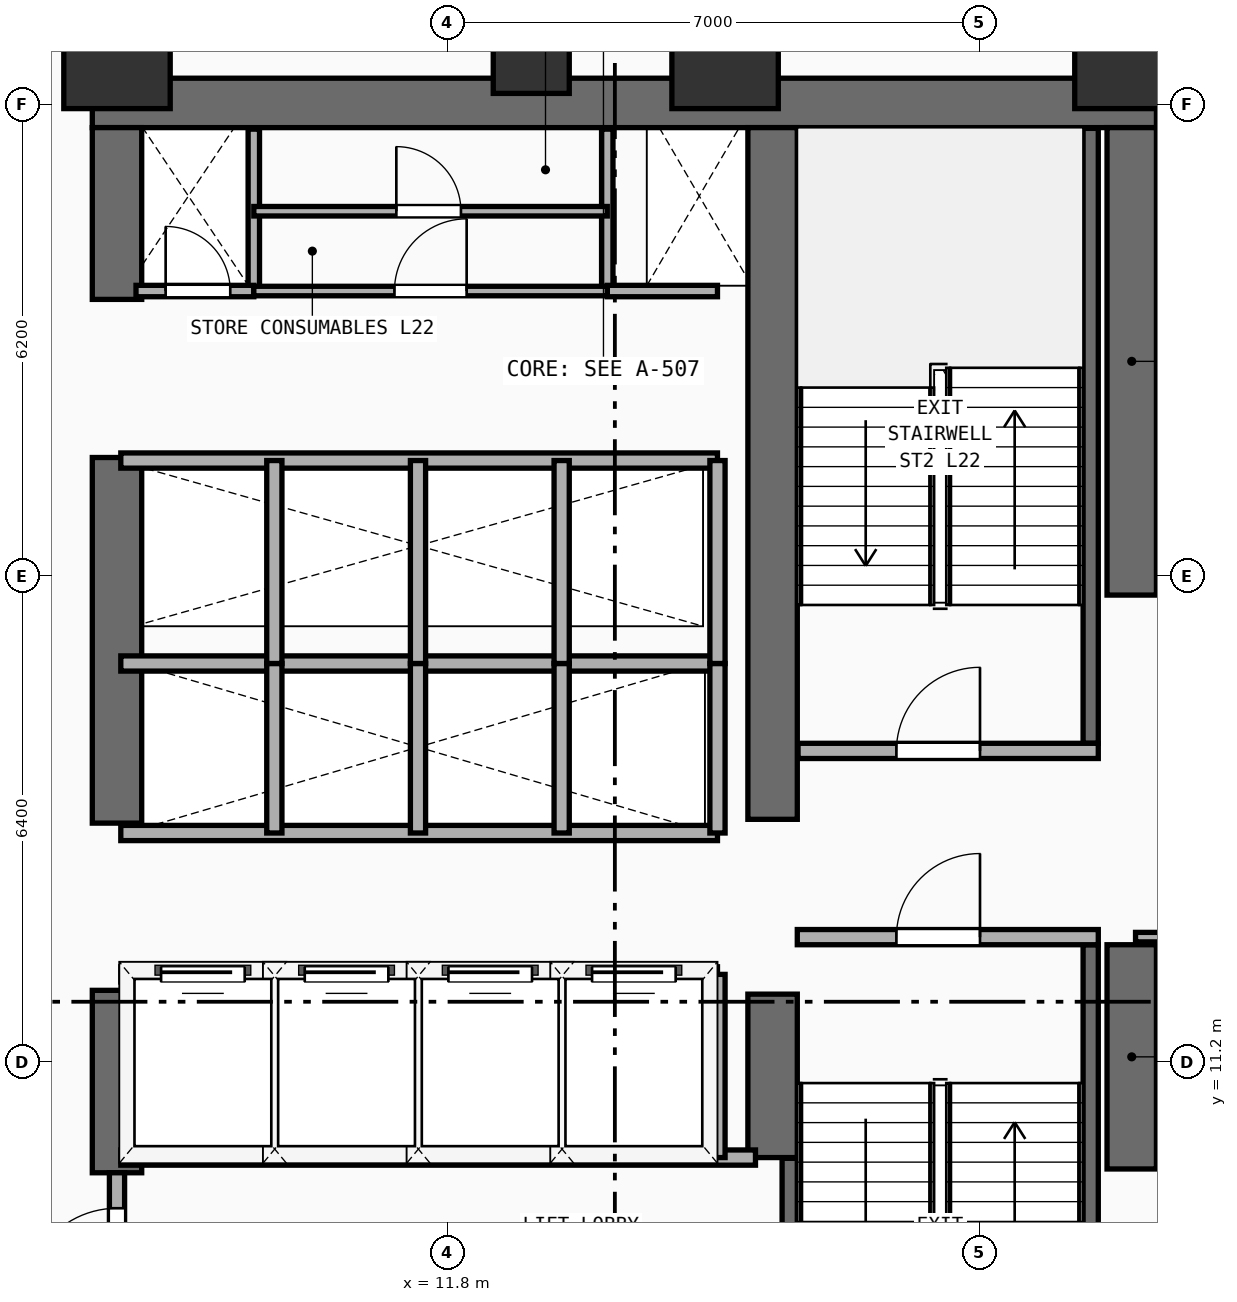
"""IFC4 building model, lengths in metres.
Left out: names, types, materials, properties, quantities, classifications, styles, units other than length and angle.
Written with IfcOpenShell. Run it as: python <this file> out.ifc"""

import sys

from ifc_helpers import new_model, si_unit, direction, frame, frame_2d, origin, origin_2d, place, context, subcontext, project, spatial, rectangle, extrude, element, fill, save


model = new_model("IFC4")
c1 = context("Model", 3, precision=1e-05, world=origin(), true_north=direction((0.0, 1.0)))
c2 = subcontext(c1, "Body", "Model", "MODEL_VIEW")
j1 = project(units=[si_unit("LENGTHUNIT", "METRE"), si_unit("PLANEANGLEUNIT", "RADIAN")], contexts=[c1])
p1 = place(None, origin())
s1 = spatial("IfcSite", under=j1, at=p1, CompositionType="ELEMENT")
p2 = place(p1, origin())
s2 = spatial("IfcBuilding", under=s1, at=p2, CompositionType="ELEMENT")
p3 = place(p2, frame((0.0, 0.0, 87.9)))
s3 = spatial("IfcBuildingStorey", under=s2, at=p3, CompositionType="ELEMENT", Elevation=87.9)
p4 = place(p3, frame((7.125, 23.825, 0.0), z_axis=(0.0, 0.0, 1.0), x_axis=(1.0, 0.0, 0.0)))
e1 = element("IfcWall", 1, at=p4, inside=s3, PredefinedType="SHEAR", context=c2, shape_type="SweptSolid", body=[
    extrude(rectangle(XDim=14.0, YDim=0.65, at=frame_2d((7.0, 0.0))), origin(), (0.0, 0.0, 1.0), 3.54),
])
p5 = place(p3, frame((7.45, 9.75, 0.0), z_axis=(0.0, 0.0, 1.0), x_axis=(0.0, 1.0, 0.0)))
e2 = element("IfcWall", 2, at=p5, inside=s3, PredefinedType="SHEAR", context=c2, shape_type="SweptSolid", body=[
    extrude(rectangle(XDim=2.4, YDim=0.65, at=frame_2d((1.2, 0.0))), origin(), (0.0, 0.0, 1.0), 3.54),
])
p6 = place(p3, frame((7.45, 14.35, 0.0), z_axis=(0.0, 0.0, 1.0), x_axis=(0.0, 1.0, 0.0)))
e3 = element("IfcWall", 3, at=p6, inside=s3, PredefinedType="SHEAR", context=c2, shape_type="SweptSolid", body=[
    extrude(rectangle(XDim=4.81, YDim=0.65, at=frame_2d((2.405, 0.0))), origin(), (0.0, 0.0, 1.0), 3.54),
])
p7 = place(p3, frame((7.45, 21.24, 0.0), z_axis=(0.0, 0.0, 1.0), x_axis=(0.0, 1.0, 0.0)))
e4 = element("IfcWall", 4, at=p7, inside=s3, PredefinedType="SHEAR", context=c2, shape_type="SweptSolid", body=[
    extrude(rectangle(XDim=2.26, YDim=0.65, at=frame_2d((1.13, 0.0))), origin(), (0.0, 0.0, 1.0), 3.54),
])
p8 = place(p3, frame((20.8, 9.8, 0.0), z_axis=(0.0, 0.0, 1.0), x_axis=(0.0, 1.0, 0.0)))
e5 = element("IfcWall", 5, at=p8, inside=s3, PredefinedType="SHEAR", context=c2, shape_type="SweptSolid", body=[
    extrude(rectangle(XDim=2.95, YDim=0.65, at=frame_2d((1.475, 0.0))), origin(), (0.0, 0.0, 1.0), 3.54),
])
p9 = place(p3, frame((20.8, 17.35, 0.0), z_axis=(0.0, 0.0, 1.0), x_axis=(0.0, 1.0, 0.0)))
e6 = element("IfcWall", 6, at=p9, inside=s3, PredefinedType="SHEAR", context=c2, shape_type="SweptSolid", body=[
    extrude(rectangle(XDim=6.15, YDim=0.65, at=frame_2d((3.075, 0.0))), origin(), (0.0, 0.0, 1.0), 3.54),
])
p10 = place(p3, frame((16.075, 9.95, 0.0), z_axis=(0.0, 0.0, 1.0), x_axis=(0.0, 1.0, 0.0)))
e7 = element("IfcWall", 7, at=p10, inside=s3, PredefinedType="SHEAR", context=c2, shape_type="SweptSolid", body=[
    extrude(rectangle(XDim=2.15, YDim=0.65, at=frame_2d((1.075, 0.0))), origin(), (0.0, 0.0, 1.0), 3.54),
])
p11 = place(p3, frame((16.075, 14.4, 0.0), z_axis=(0.0, 0.0, 1.0), x_axis=(0.0, 1.0, 0.0)))
e8 = element("IfcWall", 8, at=p11, inside=s3, PredefinedType="SHEAR", context=c2, shape_type="SweptSolid", body=[
    extrude(rectangle(XDim=9.1, YDim=0.65, at=frame_2d((4.55, 0.0))), origin(), (0.0, 0.0, 1.0), 3.54),
])
for number, where, z_axis, x_axis in (
    (9, (7.45, 24.45, 0.0), (0.0, 0.0, 1.0), (1.0, 0.0, 0.0)),
    (10, (15.45, 24.45, 0.0), (0.0, 0.0, 1.0), (1.0, 0.0, 0.0)),
    (11, (20.75, 24.45, 0.0), (0.0, 0.0, 1.0), (1.0, 0.0, 0.0)),
):
    element("IfcColumn", number, at=place(p3, frame(where, z_axis=z_axis, x_axis=x_axis)), inside=s3, PredefinedType="COLUMN", context=c2, shape_type="SweptSolid", body=[
        extrude(rectangle(XDim=1.4, YDim=1.4, at=origin_2d()), origin(), (0.0, 0.0, 1.0), 3.54),
    ])
p12 = place(p3, frame((12.9, 24.45, 0.0), z_axis=(0.0, 0.0, 1.0), x_axis=(1.0, 0.0, 0.0)))
e12 = element("IfcColumn", 12, at=p12, inside=s3, PredefinedType="COLUMN", context=c2, shape_type="SweptSolid", body=[
    extrude(rectangle(XDim=1.0, YDim=1.0, at=origin_2d()), origin(), (0.0, 0.0, 1.0), 3.54),
])
p13 = place(p3, frame((16.3, 7.36, 0.0), z_axis=(0.0, 0.0, 1.0), x_axis=(0.0, 1.0, 0.0)))
e13 = element("IfcWall", 13, at=p13, inside=s3, PredefinedType="SHEAR", context=c2, shape_type="SweptSolid", body=[
    extrude(rectangle(XDim=2.58, YDim=0.2, at=frame_2d((1.29, 0.0))), origin(), (0.0, 0.0, 1.0), 3.54),
])
p14 = place(p3, frame((20.26, 4.66, 0.0), z_axis=(0.0, 0.0, 1.0), x_axis=(0.0, 1.0, 0.0)))
e14 = element("IfcWall", 14, at=p14, inside=s3, PredefinedType="SHEAR", context=c2, shape_type="SweptSolid", body=[
    extrude(rectangle(XDim=8.09, YDim=0.2, at=frame_2d((4.045, 0.0))), origin(), (0.0, 0.0, 1.0), 3.54),
])
p15 = place(p3, frame((16.4, 12.85, 0.0), z_axis=(0.0, 0.0, 1.0), x_axis=(1.0, 0.0, 0.0)))
e15 = element("IfcWall", 15, at=p15, inside=s3, PredefinedType="PARTITIONING", context=c2, shape_type="SweptSolid", body=[
    extrude(rectangle(XDim=3.96, YDim=0.2, at=frame_2d((1.98, 0.0))), origin(), (0.0, 0.0, 1.0), 3.54),
])
p16 = place(p15, frame((1.304, 0.0, 0.0)))
e16 = element("IfcOpeningElement", 16, at=p16, cuts=e15, PredefinedType="OPENING", context=c2, shape_type="SweptSolid", body=[
    extrude(rectangle(XDim=1.1, YDim=2.2, at=frame_2d((0.55, 1.1))), frame((0.0, 0.11, 0.0), z_axis=(0.0, -1.0, 0.0), x_axis=(1.0, 0.0, 0.0)), (0.0, 0.0, 1.0), 0.22),
])
p17 = place(p3, frame((20.26, 15.4, 0.0), z_axis=(0.0, 0.0, 1.0), x_axis=(0.0, 1.0, 0.0)))
e17 = element("IfcWall", 17, at=p17, inside=s3, PredefinedType="SHEAR", context=c2, shape_type="SweptSolid", body=[
    extrude(rectangle(XDim=8.09, YDim=0.2, at=frame_2d((4.045, 0.0))), origin(), (0.0, 0.0, 1.0), 3.54),
])
p18 = place(p3, frame((16.41, 15.3, 0.0), z_axis=(0.0, 0.0, 1.0), x_axis=(1.0, 0.0, 0.0)))
e18 = element("IfcWall", 18, at=p18, inside=s3, PredefinedType="PARTITIONING", context=c2, shape_type="SweptSolid", body=[
    extrude(rectangle(XDim=3.95, YDim=0.2, at=frame_2d((1.975, 0.0))), origin(), (0.0, 0.0, 1.0), 3.54),
])
p19 = place(p18, frame((1.294, 0.0, 0.0)))
e19 = element("IfcOpeningElement", 19, at=p19, cuts=e18, PredefinedType="OPENING", context=c2, shape_type="SweptSolid", body=[
    extrude(rectangle(XDim=1.1, YDim=2.2, at=frame_2d((0.55, 1.1))), frame((0.0, 0.11, 0.0), z_axis=(0.0, -1.0, 0.0), x_axis=(1.0, 0.0, 0.0)), (0.0, 0.0, 1.0), 0.22),
])
p20 = place(p3, frame((7.5, 9.95, 0.0), z_axis=(0.0, 0.0, 1.0), x_axis=(1.0, 0.0, 0.0)))
e20 = element("IfcWall", 20, at=p20, inside=s3, PredefinedType="PARTITIONING", context=c2, shape_type="SweptSolid", body=[
    extrude(rectangle(XDim=8.35, YDim=0.2, at=frame_2d((4.175, 0.0))), origin(), (0.0, 0.0, 1.0), 3.54),
])
p21 = place(p3, frame((7.45, 7.45, 0.0), z_axis=(0.0, 0.0, 1.0), x_axis=(0.0, 1.0, 0.0)))
e21 = element("IfcWall", 21, at=p21, inside=s3, PredefinedType="PARTITIONING", context=c2, shape_type="SweptSolid", body=[
    extrude(rectangle(XDim=2.3, YDim=0.2, at=frame_2d((1.15, 0.0))), origin(), (0.0, 0.0, 1.0), 2.52),
])
p22 = place(p21, frame((0.633, 0.0, 0.0)))
e22 = element("IfcOpeningElement", 22, at=p22, cuts=e21, PredefinedType="OPENING", context=c2, shape_type="SweptSolid", body=[
    extrude(rectangle(XDim=1.2, YDim=2.25, at=frame_2d((0.6, 1.125))), frame((0.0, 0.11, 0.0), z_axis=(0.0, -1.0, 0.0), x_axis=(1.0, 0.0, 0.0)), (0.0, 0.0, 1.0), 0.22),
])
p23 = place(p3, frame((7.5, 12.36, 0.0), z_axis=(0.0, 0.0, 1.0), x_axis=(1.0, 0.0, 0.0)))
e23 = element("IfcWall", 23, at=p23, inside=s3, PredefinedType="PARTITIONING", context=c2, shape_type="SweptSolid", body=[
    extrude(rectangle(XDim=7.85, YDim=0.2, at=frame_2d((3.925, 0.0))), origin(), (0.0, 0.0, 1.0), 3.54),
])
p24 = place(p23, frame((0.53, 0.0, 0.0)))
e24 = element("IfcOpeningElement", 24, at=p24, cuts=e23, PredefinedType="OPENING", context=c2, shape_type="SweptSolid", body=[
    extrude(rectangle(XDim=1.1, YDim=2.2, at=frame_2d((0.55, 1.1))), frame((0.0, 0.11, 0.0), z_axis=(0.0, -1.0, 0.0), x_axis=(1.0, 0.0, 0.0)), (0.0, 0.0, 1.0), 0.22),
])
p25 = place(p23, frame((2.42, 0.0, 0.0)))
e25 = element("IfcOpeningElement", 25, at=p25, cuts=e23, PredefinedType="OPENING", context=c2, shape_type="SweptSolid", body=[
    extrude(rectangle(XDim=1.1, YDim=2.2, at=frame_2d((0.55, 1.1))), frame((0.0, 0.11, 0.0), z_axis=(0.0, -1.0, 0.0), x_axis=(1.0, 0.0, 0.0)), (0.0, 0.0, 1.0), 0.22),
])
p26 = place(p23, frame((4.31, 0.0, 0.0)))
e26 = element("IfcOpeningElement", 26, at=p26, cuts=e23, PredefinedType="OPENING", context=c2, shape_type="SweptSolid", body=[
    extrude(rectangle(XDim=1.1, YDim=2.2, at=frame_2d((0.55, 1.1))), frame((0.0, 0.11, 0.0), z_axis=(0.0, -1.0, 0.0), x_axis=(1.0, 0.0, 0.0)), (0.0, 0.0, 1.0), 0.22),
])
p27 = place(p23, frame((6.2, 0.0, 0.0)))
e27 = element("IfcOpeningElement", 27, at=p27, cuts=e23, PredefinedType="OPENING", context=c2, shape_type="SweptSolid", body=[
    extrude(rectangle(XDim=1.1, YDim=2.2, at=frame_2d((0.55, 1.1))), frame((0.0, 0.11, 0.0), z_axis=(0.0, -1.0, 0.0), x_axis=(1.0, 0.0, 0.0)), (0.0, 0.0, 1.0), 0.22),
])
for number, where, z_axis, x_axis in (
    (28, (15.35, 9.95, 0.0), (0.0, 0.0, 1.0), (0.0, 1.0, 0.0)),
    (29, (9.52, 9.95, 0.0), (0.0, 0.0, 1.0), (0.0, 1.0, 0.0)),
    (30, (11.41, 9.95, 0.0), (0.0, 0.0, 1.0), (0.0, 1.0, 0.0)),
    (31, (13.3, 9.95, 0.0), (0.0, 0.0, 1.0), (0.0, 1.0, 0.0)),
):
    element("IfcWall", number, at=place(p3, frame(where, z_axis=z_axis, x_axis=x_axis)), inside=s3, PredefinedType="PARTITIONING", context=c2, shape_type="SweptSolid", body=[
        extrude(rectangle(XDim=2.41, YDim=0.2, at=frame_2d((1.205, 0.0))), origin(), (0.0, 0.0, 1.0), 3.54),
    ])
for number, where, z_axis, x_axis in (
    (32, (7.5, 14.22, 0.0), (0.0, 0.0, 1.0), (1.0, 0.0, 0.0)),
    (33, (7.5, 16.45, 0.0), (0.0, 0.0, 1.0), (1.0, 0.0, 0.0)),
):
    element("IfcWall", number, at=place(p3, frame(where, z_axis=z_axis, x_axis=x_axis)), inside=s3, PredefinedType="PARTITIONING", context=c2, shape_type="SweptSolid", body=[
        extrude(rectangle(XDim=7.85, YDim=0.2, at=frame_2d((3.925, 0.0))), origin(), (0.0, 0.0, 1.0), 3.54),
    ])
for number, where, z_axis, x_axis in (
    (34, (15.35, 14.22, 0.0), (0.0, 0.0, 1.0), (0.0, 1.0, 0.0)),
    (35, (9.52, 14.22, 0.0), (0.0, 0.0, 1.0), (0.0, 1.0, 0.0)),
    (36, (11.41, 14.22, 0.0), (0.0, 0.0, 1.0), (0.0, 1.0, 0.0)),
    (37, (13.3, 14.22, 0.0), (0.0, 0.0, 1.0), (0.0, 1.0, 0.0)),
):
    element("IfcWall", number, at=place(p3, frame(where, z_axis=z_axis, x_axis=x_axis)), inside=s3, PredefinedType="PARTITIONING", context=c2, shape_type="SweptSolid", body=[
        extrude(rectangle(XDim=2.23, YDim=0.2, at=frame_2d((1.115, 0.0))), origin(), (0.0, 0.0, 1.0), 3.54),
    ])
p28 = place(p3, frame((7.5, 19.12, 0.0), z_axis=(0.0, 0.0, 1.0), x_axis=(1.0, 0.0, 0.0)))
e38 = element("IfcWall", 38, at=p28, inside=s3, PredefinedType="PARTITIONING", context=c2, shape_type="SweptSolid", body=[
    extrude(rectangle(XDim=7.85, YDim=0.2, at=frame_2d((3.925, 0.0))), origin(), (0.0, 0.0, 1.0), 3.54),
])
for number, where, z_axis, x_axis in (
    (39, (15.35, 16.45, 0.0), (0.0, 0.0, 1.0), (0.0, 1.0, 0.0)),
    (40, (9.52, 16.45, 0.0), (0.0, 0.0, 1.0), (0.0, 1.0, 0.0)),
    (41, (11.41, 16.45, 0.0), (0.0, 0.0, 1.0), (0.0, 1.0, 0.0)),
    (42, (13.3, 16.45, 0.0), (0.0, 0.0, 1.0), (0.0, 1.0, 0.0)),
):
    element("IfcWall", number, at=place(p3, frame(where, z_axis=z_axis, x_axis=x_axis)), inside=s3, PredefinedType="PARTITIONING", context=c2, shape_type="SweptSolid", body=[
        extrude(rectangle(XDim=2.67, YDim=0.2, at=frame_2d((1.335, 0.0))), origin(), (0.0, 0.0, 1.0), 3.54),
    ])
for number, where, z_axis, x_axis in (
    (43, (9.25, 21.35, 0.0), (0.0, 0.0, 1.0), (0.0, 1.0, 0.0)),
    (44, (13.9, 21.35, 0.0), (0.0, 0.0, 1.0), (0.0, 1.0, 0.0)),
):
    element("IfcWall", number, at=place(p3, frame(where, z_axis=z_axis, x_axis=x_axis)), inside=s3, PredefinedType="PARTITIONING", context=c2, shape_type="SweptSolid", body=[
        extrude(rectangle(XDim=2.13, YDim=0.15, at=frame_2d((1.065, 0.0))), origin(), (0.0, 0.0, 1.0), 3.54),
    ])
p29 = place(p3, frame((7.7, 21.35, 0.0), z_axis=(0.0, 0.0, 1.0), x_axis=(1.0, 0.0, 0.0)))
e45 = element("IfcWall", 45, at=p29, inside=s3, PredefinedType="PARTITIONING", context=c2, shape_type="SweptSolid", body=[
    extrude(rectangle(XDim=1.55, YDim=0.15, at=frame_2d((0.775, 0.0))), origin(), (0.0, 0.0, 1.0), 3.54),
])
p30 = place(p29, frame((0.39, 0.0, 0.0)))
e46 = element("IfcOpeningElement", 46, at=p30, cuts=e45, PredefinedType="OPENING", context=c2, shape_type="SweptSolid", body=[
    extrude(rectangle(XDim=0.85, YDim=2.15, at=frame_2d((0.425, 1.075))), frame((0.0, 0.085, 0.0), z_axis=(0.0, -1.0, 0.0), x_axis=(1.0, 0.0, 0.0)), (0.0, 0.0, 1.0), 0.17),
])
p31 = place(p3, frame((13.9, 21.35, 0.0), z_axis=(0.0, 0.0, 1.0), x_axis=(1.0, 0.0, 0.0)))
e47 = element("IfcWall", 47, at=p31, inside=s3, PredefinedType="PARTITIONING", context=c2, shape_type="SweptSolid", body=[
    extrude(rectangle(XDim=1.45, YDim=0.15, at=frame_2d((0.725, 0.0))), origin(), (0.0, 0.0, 1.0), 3.54),
])
p32 = place(p3, frame((9.25, 21.35, 0.0), z_axis=(0.0, 0.0, 1.0), x_axis=(1.0, 0.0, 0.0)))
e48 = element("IfcWall", 48, at=p32, inside=s3, PredefinedType="PARTITIONING", context=c2, shape_type="SweptSolid", body=[
    extrude(rectangle(XDim=4.65, YDim=0.125, at=frame_2d((2.325, 0.0))), origin(), (0.0, 0.0, 1.0), 3.54),
])
p33 = place(p32, frame((1.85, 0.0, 0.0)))
e49 = element("IfcOpeningElement", 49, at=p33, cuts=e48, PredefinedType="OPENING", context=c2, shape_type="SweptSolid", body=[
    extrude(rectangle(XDim=0.95, YDim=2.15, at=frame_2d((0.475, 1.075))), frame((0.0, 0.073, 0.0), z_axis=(0.0, -1.0, 0.0), x_axis=(1.0, 0.0, 0.0)), (0.0, 0.0, 1.0), 0.145),
])
p34 = place(p3, frame((9.25, 22.4, 0.0), z_axis=(0.0, 0.0, 1.0), x_axis=(1.0, 0.0, 0.0)))
e50 = element("IfcWall", 50, at=p34, inside=s3, PredefinedType="PARTITIONING", context=c2, shape_type="SweptSolid", body=[
    extrude(rectangle(XDim=4.65, YDim=0.125, at=frame_2d((2.325, 0.0))), origin(), (0.0, 0.0, 1.0), 3.54),
])
p35 = place(p34, frame((1.875, 0.0, 0.0)))
e51 = element("IfcOpeningElement", 51, at=p35, cuts=e50, PredefinedType="OPENING", context=c2, shape_type="SweptSolid", body=[
    extrude(rectangle(XDim=0.85, YDim=2.15, at=frame_2d((0.425, 1.075))), frame((0.0, 0.073, 0.0), z_axis=(0.0, -1.0, 0.0), x_axis=(1.0, 0.0, 0.0)), (0.0, 0.0, 1.0), 0.145),
])
p36 = place(p3, frame((20.85, 12.85, 0.0), z_axis=(0.0, 0.0, 1.0), x_axis=(1.0, 0.0, 0.0)))
e52 = element("IfcWall", 52, at=p36, inside=s3, PredefinedType="PARTITIONING", context=c2, shape_type="SweptSolid", body=[
    extrude(rectangle(XDim=7.05, YDim=0.125, at=frame_2d((3.525, 0.0))), origin(), (0.0, 0.0, 1.0), 3.54),
])
p37 = place(p36, frame((2.8, 0.0, 0.0)))
e53 = element("IfcOpeningElement", 53, at=p37, cuts=e52, PredefinedType="OPENING", context=c2, shape_type="SweptSolid", body=[
    extrude(rectangle(XDim=0.95, YDim=2.15, at=frame_2d((0.475, 1.075))), frame((0.0, 0.073, 0.0), z_axis=(0.0, -1.0, 0.0), x_axis=(1.0, 0.0, 0.0)), (0.0, 0.0, 1.0), 0.145),
])
p38 = place(p16, frame((1.1, 0.0, 0.0), z_axis=(0.0, 0.0, 1.0), x_axis=(-1.0, 0.0, 0.0)))
e54 = element("IfcDoor", 54, at=p38, inside=s3, OperationType="SINGLE_SWING_LEFT", PredefinedType="DOOR", context=c2, shape_type="SweptSolid", body=[
    extrude(rectangle(XDim=1.1, YDim=2.2, at=frame_2d((0.55, 1.1))), frame((0.0, 0.025, 0.0), z_axis=(0.0, -1.0, 0.0), x_axis=(1.0, 0.0, 0.0)), (0.0, 0.0, 1.0), 0.05),
])
fill(e16, e54)
p39 = place(p19, origin())
e55 = element("IfcDoor", 55, at=p39, inside=s3, OperationType="SINGLE_SWING_RIGHT", PredefinedType="DOOR", context=c2, shape_type="SweptSolid", body=[
    extrude(rectangle(XDim=1.1, YDim=2.2, at=frame_2d((0.55, 1.1))), frame((0.0, 0.025, 0.0), z_axis=(0.0, -1.0, 0.0), x_axis=(1.0, 0.0, 0.0)), (0.0, 0.0, 1.0), 0.05),
])
fill(e19, e55)
p40 = place(p22, frame((1.2, 0.0, 0.0), z_axis=(0.0, 0.0, 1.0), x_axis=(-1.0, 0.0, 0.0)))
e56 = element("IfcDoor", 56, at=p40, inside=s3, OperationType="SINGLE_SWING_RIGHT", PredefinedType="DOOR", context=c2, shape_type="SweptSolid", body=[
    extrude(rectangle(XDim=1.2, YDim=2.25, at=frame_2d((0.6, 1.125))), frame((0.0, 0.025, 0.0), z_axis=(0.0, -1.0, 0.0), x_axis=(1.0, 0.0, 0.0)), (0.0, 0.0, 1.0), 0.05),
])
fill(e22, e56)
p41 = place(p24, origin())
e57 = element("IfcDoor", 57, at=p41, inside=s3, OperationType="SLIDING_TO_LEFT", PredefinedType="DOOR", context=c2, shape_type="SweptSolid", body=[
    extrude(rectangle(XDim=1.1, YDim=2.2, at=frame_2d((0.55, 1.1))), frame((0.0, 0.025, 0.0), z_axis=(0.0, -1.0, 0.0), x_axis=(1.0, 0.0, 0.0)), (0.0, 0.0, 1.0), 0.05),
])
fill(e24, e57)
p42 = place(p25, origin())
e58 = element("IfcDoor", 58, at=p42, inside=s3, OperationType="SLIDING_TO_LEFT", PredefinedType="DOOR", context=c2, shape_type="SweptSolid", body=[
    extrude(rectangle(XDim=1.1, YDim=2.2, at=frame_2d((0.55, 1.1))), frame((0.0, 0.025, 0.0), z_axis=(0.0, -1.0, 0.0), x_axis=(1.0, 0.0, 0.0)), (0.0, 0.0, 1.0), 0.05),
])
fill(e25, e58)
p43 = place(p26, origin())
e59 = element("IfcDoor", 59, at=p43, inside=s3, OperationType="SLIDING_TO_LEFT", PredefinedType="DOOR", context=c2, shape_type="SweptSolid", body=[
    extrude(rectangle(XDim=1.1, YDim=2.2, at=frame_2d((0.55, 1.1))), frame((0.0, 0.025, 0.0), z_axis=(0.0, -1.0, 0.0), x_axis=(1.0, 0.0, 0.0)), (0.0, 0.0, 1.0), 0.05),
])
fill(e26, e59)
p44 = place(p27, origin())
e60 = element("IfcDoor", 60, at=p44, inside=s3, OperationType="SLIDING_TO_LEFT", PredefinedType="DOOR", context=c2, shape_type="SweptSolid", body=[
    extrude(rectangle(XDim=1.1, YDim=2.2, at=frame_2d((0.55, 1.1))), frame((0.0, 0.025, 0.0), z_axis=(0.0, -1.0, 0.0), x_axis=(1.0, 0.0, 0.0)), (0.0, 0.0, 1.0), 0.05),
])
fill(e27, e60)
p45 = place(p30, origin())
e61 = element("IfcDoor", 61, at=p45, inside=s3, OperationType="SINGLE_SWING_LEFT", PredefinedType="DOOR", context=c2, shape_type="SweptSolid", body=[
    extrude(rectangle(XDim=0.85, YDim=2.15, at=frame_2d((0.425, 1.075))), frame((0.0, 0.025, 0.0), z_axis=(0.0, -1.0, 0.0), x_axis=(1.0, 0.0, 0.0)), (0.0, 0.0, 1.0), 0.05),
])
fill(e46, e61)
p46 = place(p33, origin())
e62 = element("IfcDoor", 62, at=p46, inside=s3, OperationType="SINGLE_SWING_RIGHT", PredefinedType="DOOR", context=c2, shape_type="SweptSolid", body=[
    extrude(rectangle(XDim=0.95, YDim=2.15, at=frame_2d((0.475, 1.075))), frame((0.0, 0.025, 0.0), z_axis=(0.0, -1.0, 0.0), x_axis=(1.0, 0.0, 0.0)), (0.0, 0.0, 1.0), 0.05),
])
fill(e49, e62)
p47 = place(p35, origin())
e63 = element("IfcDoor", 63, at=p47, inside=s3, OperationType="SINGLE_SWING_LEFT", PredefinedType="DOOR", context=c2, shape_type="SweptSolid", body=[
    extrude(rectangle(XDim=0.85, YDim=2.15, at=frame_2d((0.425, 1.075))), frame((0.0, 0.025, 0.0), z_axis=(0.0, -1.0, 0.0), x_axis=(1.0, 0.0, 0.0)), (0.0, 0.0, 1.0), 0.05),
])
fill(e51, e63)
save(model, sys.argv[1])
